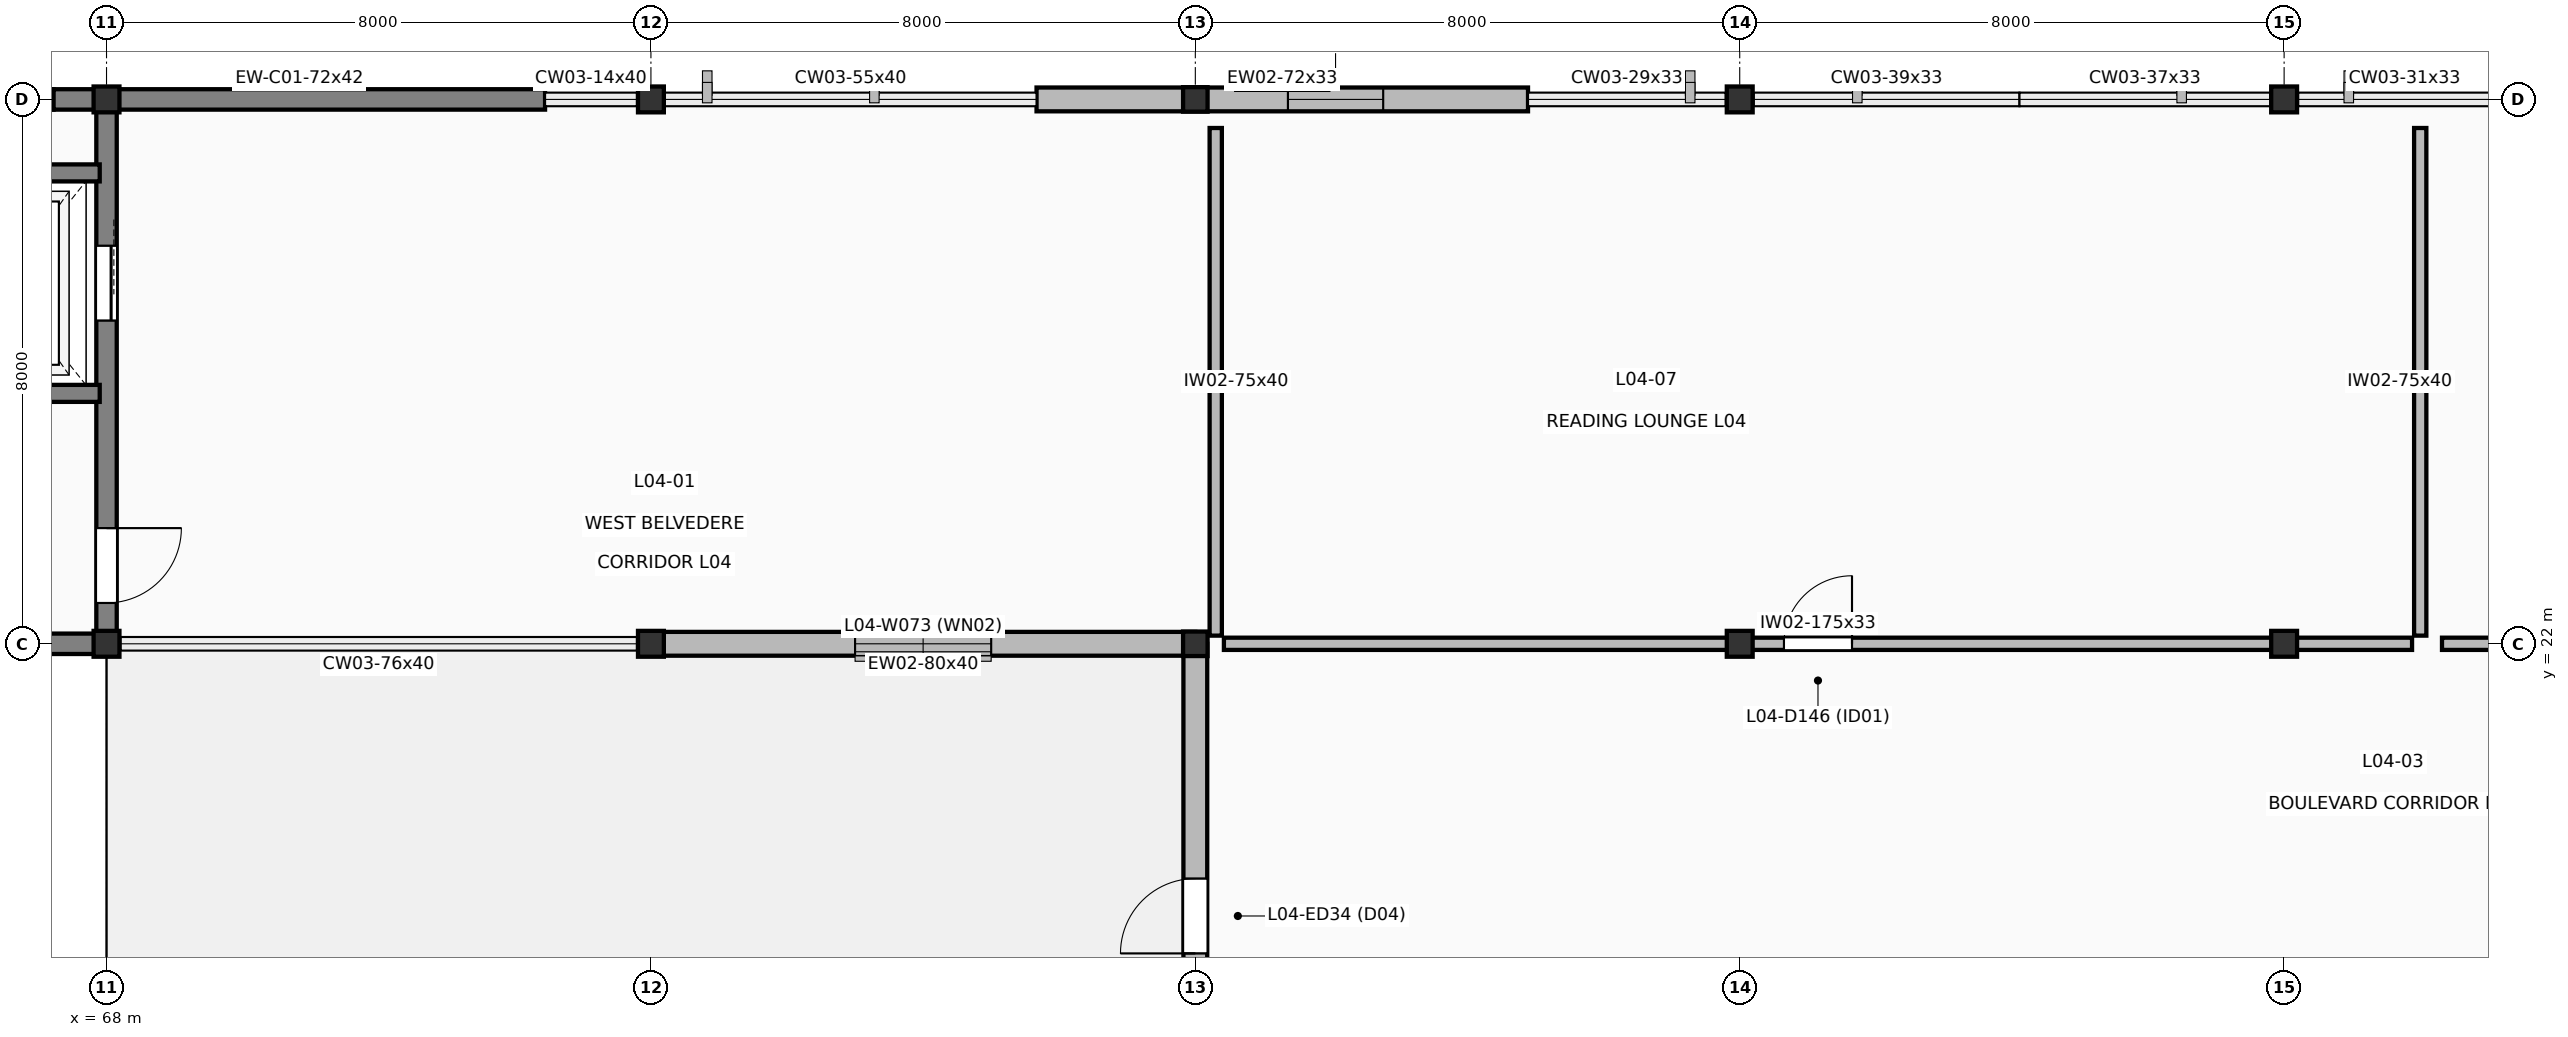
"""IFC4 building model, lengths in metres.
Left out: names, types, materials, properties, quantities, classifications, styles, units other than length and angle.
Written with IfcOpenShell. Run it as: python <this file> out.ifc"""

import sys

from ifc_helpers import new_model, si_unit, direction, frame, frame_2d, origin, origin_2d, place, context, subcontext, project, spatial, rectangle, extrude, element, fill, save


model = new_model("IFC4")
c1 = context("Model", 3, precision=1e-05, world=origin(), true_north=direction((0.0, 1.0)))
c2 = subcontext(c1, "Body", "Model", "MODEL_VIEW")
j1 = project(units=[si_unit("LENGTHUNIT", "METRE"), si_unit("PLANEANGLEUNIT", "RADIAN")], contexts=[c1])
p1 = place(None, origin())
s1 = spatial("IfcSite", under=j1, at=p1, CompositionType="ELEMENT")
p2 = place(p1, origin())
s2 = spatial("IfcBuilding", under=s1, at=p2, CompositionType="ELEMENT")
p3 = place(p2, frame((0.0, 0.0, 18.0)))
s3 = spatial("IfcBuildingStorey", under=s2, at=p3, CompositionType="ELEMENT", Elevation=18.0)
for number, where, z_axis, x_axis in (
    (1, (68.0, 22.0, 0.0), (0.0, 0.0, 1.0), (1.0, 0.0, 0.0)),
    (2, (68.0, 30.0, 0.0), (0.0, 0.0, 1.0), (1.0, 0.0, 0.0)),
    (3, (76.0, 22.0, 0.0), (0.0, 0.0, 1.0), (1.0, 0.0, 0.0)),
    (4, (76.0, 30.0, 0.0), (0.0, 0.0, 1.0), (1.0, 0.0, 0.0)),
):
    element("IfcColumn", number, at=place(p3, frame(where, z_axis=z_axis, x_axis=x_axis)), inside=s3, PredefinedType="COLUMN", context=c2, shape_type="SweptSolid", body=[
        extrude(rectangle(XDim=0.38, YDim=0.38, at=origin_2d()), origin(), (0.0, 0.0, 1.0), 4.2),
    ])
for number, where, z_axis, x_axis in (
    (5, (84.0, 22.0, 0.0), (0.0, 0.0, 1.0), (1.0, 0.0, 0.0)),
    (6, (84.0, 30.0, 0.0), (0.0, 0.0, 1.0), (1.0, 0.0, 0.0)),
):
    element("IfcColumn", number, at=place(p3, frame(where, z_axis=z_axis, x_axis=x_axis)), inside=s3, PredefinedType="COLUMN", context=c2, shape_type="SweptSolid", body=[
        extrude(rectangle(XDim=0.36, YDim=0.36, at=origin_2d()), origin(), (0.0, 0.0, 1.0), 4.2),
    ])
for number, where, z_axis, x_axis in (
    (7, (92.0, 22.0, 0.0), (0.0, 0.0, 1.0), (1.0, 0.0, 0.0)),
    (8, (92.0, 30.0, 0.0), (0.0, 0.0, 1.0), (1.0, 0.0, 0.0)),
    (9, (100.0, 22.0, 0.0), (0.0, 0.0, 1.0), (1.0, 0.0, 0.0)),
    (10, (100.0, 30.0, 0.0), (0.0, 0.0, 1.0), (1.0, 0.0, 0.0)),
):
    element("IfcColumn", number, at=place(p3, frame(where, z_axis=z_axis, x_axis=x_axis)), inside=s3, PredefinedType="COLUMN", context=c2, shape_type="SweptSolid", body=[
        extrude(rectangle(XDim=0.38, YDim=0.38, at=origin_2d()), origin(), (0.0, 0.0, 1.0), 4.2),
    ])
p4 = place(p3, frame((84.0, 14.0, 0.0), z_axis=(0.0, 0.0, 1.0), x_axis=(0.0, 1.0, 0.0)))
e11 = element("IfcWall", 11, at=p4, inside=s3, PredefinedType="SOLIDWALL", context=c2, shape_type="SweptSolid", body=[
    extrude(rectangle(XDim=8.0, YDim=0.35, at=frame_2d((4.0, 0.0))), origin(), (0.0, 0.0, 1.0), 3.345),
])
p5 = place(p4, frame((3.45, 0.0, 0.0)))
e12 = element("IfcOpeningElement", 12, at=p5, cuts=e11, PredefinedType="OPENING", context=c2, shape_type="SweptSolid", body=[
    extrude(rectangle(XDim=1.1, YDim=2.2, at=frame_2d((0.55, 1.1))), frame((0.0, 0.185, 0.0), z_axis=(0.0, -1.0, 0.0), x_axis=(1.0, 0.0, 0.0)), (0.0, 0.0, 1.0), 0.37),
])
p6 = place(p3, frame((84.0, 22.0, 0.0), z_axis=(0.0, 0.0, 1.0), x_axis=(-1.0, 0.0, 0.0)))
e13 = element("IfcWall", 13, at=p6, inside=s3, PredefinedType="SOLIDWALL", context=c2, shape_type="SweptSolid", body=[
    extrude(rectangle(XDim=8.0, YDim=0.35, at=frame_2d((4.0, 0.0))), origin(), (0.0, 0.0, 1.0), 4.0),
])
p7 = place(p6, frame((3.0, 0.0, 0.9)))
e14 = element("IfcOpeningElement", 14, at=p7, cuts=e13, PredefinedType="OPENING", context=c2, shape_type="SweptSolid", body=[
    extrude(rectangle(XDim=2.0, YDim=2.2, at=frame_2d((1.0, 1.1))), frame((0.0, 0.185, 0.0), z_axis=(0.0, -1.0, 0.0), x_axis=(1.0, 0.0, 0.0)), (0.0, 0.0, 1.0), 0.37),
])
for number, where, z_axis, x_axis in (
    (15, (60.0, 30.0, 0.0), (0.0, 0.0, 1.0), (1.0, 0.0, 0.0)),
    (16, (67.222, 30.0, 0.0), (0.0, 0.0, 1.0), (1.0, 0.0, 0.0)),
):
    element("IfcWall", number, at=place(p3, frame(where, z_axis=z_axis, x_axis=x_axis)), inside=s3, PredefinedType="SOLIDWALL", context=c2, shape_type="SweptSolid", body=[
        extrude(rectangle(XDim=7.222, YDim=0.3, at=frame_2d((3.611, 0.0))), origin(), (0.0, 0.0, 1.0), 4.2),
    ])
p8 = place(p3, frame((81.667, 30.0, 0.0), z_axis=(0.0, 0.0, 1.0), x_axis=(1.0, 0.0, 0.0)))
e17 = element("IfcWall", 17, at=p8, inside=s3, PredefinedType="SOLIDWALL", context=c2, shape_type="SweptSolid", body=[
    extrude(rectangle(XDim=7.222, YDim=0.35, at=frame_2d((3.611, 0.0))), origin(), (0.0, 0.0, 1.0), 3.285),
])
p9 = place(p8, frame((3.694, 0.0, 0.95)))
e18 = element("IfcOpeningElement", 18, at=p9, cuts=e17, PredefinedType="OPENING", context=c2, shape_type="SweptSolid", body=[
    extrude(rectangle(XDim=1.4, YDim=1.8, at=frame_2d((0.7, 0.9))), frame((0.0, 0.185, 0.0), z_axis=(0.0, -1.0, 0.0), x_axis=(1.0, 0.0, 0.0)), (0.0, 0.0, 1.0), 0.37),
])
p10 = place(p3, frame((68.0, 22.0, 0.0), z_axis=(0.0, 0.0, 1.0), x_axis=(-1.0, 0.0, 0.0)))
e19 = element("IfcWall", 19, at=p10, inside=s3, PredefinedType="SHEAR", context=c2, shape_type="SweptSolid", body=[
    extrude(rectangle(XDim=8.0, YDim=0.3, at=frame_2d((4.0, 0.0))), origin(), (0.0, 0.0, 1.0), 4.2),
])
p11 = place(p3, frame((68.0, 30.0, 0.0), z_axis=(0.0, 0.0, 1.0), x_axis=(0.0, -1.0, 0.0)))
e20 = element("IfcWall", 20, at=p11, inside=s3, PredefinedType="SHEAR", context=c2, shape_type="SweptSolid", body=[
    extrude(rectangle(XDim=8.0, YDim=0.3, at=frame_2d((4.0, 0.0))), origin(), (0.0, 0.0, 1.0), 4.2),
])
p12 = place(p11, frame((6.3, 0.0, 0.0)))
e21 = element("IfcOpeningElement", 21, at=p12, cuts=e20, PredefinedType="OPENING", context=c2, shape_type="SweptSolid", body=[
    extrude(rectangle(XDim=1.1, YDim=2.2, at=frame_2d((0.55, 1.1))), frame((0.0, 0.16, 0.0), z_axis=(0.0, -1.0, 0.0), x_axis=(1.0, 0.0, 0.0)), (0.0, 0.0, 1.0), 0.32),
])
p13 = place(p11, frame((2.15, 0.0, 0.0)))
e22 = element("IfcOpeningElement", 22, at=p13, cuts=e20, PredefinedType="OPENING", context=c2, shape_type="SweptSolid", body=[
    extrude(rectangle(XDim=1.1, YDim=2.2, at=frame_2d((0.55, 1.1))), frame((0.0, 0.16, 0.0), z_axis=(0.0, -1.0, 0.0), x_axis=(1.0, 0.0, 0.0)), (0.0, 0.0, 1.0), 0.32),
])
for number, where, z_axis, x_axis in (
    (23, (65.2, 25.68, 0.0), (0.0, 0.0, 1.0), (1.0, 0.0, 0.0)),
    (24, (65.2, 28.92, 0.0), (0.0, 0.0, 1.0), (1.0, 0.0, 0.0)),
):
    element("IfcWall", number, at=place(p3, frame(where, z_axis=z_axis, x_axis=x_axis)), inside=s3, PredefinedType="SHEAR", context=c2, shape_type="SweptSolid", body=[
        extrude(rectangle(XDim=2.7, YDim=0.25, at=frame_2d((1.35, 0.0))), origin(), (0.0, 0.0, 1.0), 4.2),
    ])
p14 = place(p3, frame((84.42, 22.0, 0.0), z_axis=(0.0, 0.0, 1.0), x_axis=(1.0, 0.0, 0.0)))
e25 = element("IfcWall", 25, at=p14, inside=s3, PredefinedType="PARTITIONING", context=c2, shape_type="SweptSolid", body=[
    extrude(rectangle(XDim=17.46, YDim=0.18, at=frame_2d((8.73, 0.0))), origin(), (0.0, 0.0, 1.0), 3.285),
])
p15 = place(p14, frame((8.23, 0.0, 0.0)))
e26 = element("IfcOpeningElement", 26, at=p15, cuts=e25, PredefinedType="OPENING", context=c2, shape_type="SweptSolid", body=[
    extrude(rectangle(XDim=1.0, YDim=2.15, at=frame_2d((0.5, 1.075))), frame((0.0, 0.1, 0.0), z_axis=(0.0, -1.0, 0.0), x_axis=(1.0, 0.0, 0.0)), (0.0, 0.0, 1.0), 0.2),
])
for number, where, z_axis, x_axis in (
    (27, (84.3, 29.58, 0.0), (0.0, 0.0, 1.0), (0.0, -1.0, 0.0)),
    (28, (102.0, 22.12, 0.0), (0.0, 0.0, 1.0), (0.0, 1.0, 0.0)),
):
    element("IfcWall", number, at=place(p3, frame(where, z_axis=z_axis, x_axis=x_axis)), inside=s3, PredefinedType="PARTITIONING", context=c2, shape_type="SweptSolid", body=[
        extrude(rectangle(XDim=7.46, YDim=0.18, at=frame_2d((3.73, 0.0))), origin(), (0.0, 0.0, 1.0), 4.0),
    ])
p16 = place(p3, frame((102.32, 22.0, 0.0), z_axis=(0.0, 0.0, 1.0), x_axis=(1.0, 0.0, 0.0)))
e29 = element("IfcWall", 29, at=p16, inside=s3, PredefinedType="PARTITIONING", context=c2, shape_type="SweptSolid", body=[
    extrude(rectangle(XDim=13.56, YDim=0.18, at=frame_2d((6.78, 0.0))), origin(), (0.0, 0.0, 1.0), 3.285),
])
p17 = place(p16, frame((6.28, 0.0, 0.0)))
e30 = element("IfcOpeningElement", 30, at=p17, cuts=e29, PredefinedType="OPENING", context=c2, shape_type="SweptSolid", body=[
    extrude(rectangle(XDim=1.0, YDim=2.15, at=frame_2d((0.5, 1.075))), frame((0.0, 0.1, 0.0), z_axis=(0.0, -1.0, 0.0), x_axis=(1.0, 0.0, 0.0)), (0.0, 0.0, 1.0), 0.2),
])
p18 = place(p5, origin())
e31 = element("IfcDoor", 31, at=p18, inside=s3, OperationType="SINGLE_SWING_LEFT", PredefinedType="DOOR", context=c2, shape_type="SweptSolid", body=[
    extrude(rectangle(XDim=1.1, YDim=2.2, at=frame_2d((0.55, 1.1))), frame((0.0, 0.025, 0.0), z_axis=(0.0, -1.0, 0.0), x_axis=(1.0, 0.0, 0.0)), (0.0, 0.0, 1.0), 0.05),
])
fill(e12, e31)
p19 = place(p7, origin())
e32 = element("IfcWindow", 32, at=p19, inside=s3, PartitioningType="DOUBLE_PANEL_VERTICAL", PredefinedType="WINDOW", context=c2, shape_type="SweptSolid", body=[
    extrude(rectangle(XDim=2.0, YDim=2.2, at=frame_2d((1.0, 1.1))), frame((0.0, 0.03, 0.0), z_axis=(0.0, -1.0, 0.0), x_axis=(1.0, 0.0, 0.0)), (0.0, 0.0, 1.0), 0.06),
])
fill(e14, e32)
p20 = place(p9, origin())
e33 = element("IfcWindow", 33, at=p20, inside=s3, PartitioningType="SINGLE_PANEL", PredefinedType="WINDOW", context=c2, shape_type="SweptSolid", body=[
    extrude(rectangle(XDim=1.4, YDim=1.8, at=frame_2d((0.7, 0.9))), frame((0.0, 0.03, 0.0), z_axis=(0.0, -1.0, 0.0), x_axis=(1.0, 0.0, 0.0)), (0.0, 0.0, 1.0), 0.06),
])
fill(e18, e33)
p21 = place(p12, origin())
e34 = element("IfcDoor", 34, at=p21, inside=s3, OperationType="SINGLE_SWING_LEFT", PredefinedType="DOOR", context=c2, shape_type="SweptSolid", body=[
    extrude(rectangle(XDim=1.1, YDim=2.2, at=frame_2d((0.55, 1.1))), frame((0.0, 0.025, 0.0), z_axis=(0.0, -1.0, 0.0), x_axis=(1.0, 0.0, 0.0)), (0.0, 0.0, 1.0), 0.05),
])
fill(e21, e34)
p22 = place(p13, origin())
e35 = element("IfcDoor", 35, at=p22, inside=s3, OperationType="SLIDING_TO_LEFT", PredefinedType="DOOR", context=c2, shape_type="SweptSolid", body=[
    extrude(rectangle(XDim=1.1, YDim=2.2, at=frame_2d((0.55, 1.1))), frame((0.0, 0.025, 0.0), z_axis=(0.0, -1.0, 0.0), x_axis=(1.0, 0.0, 0.0)), (0.0, 0.0, 1.0), 0.05),
])
fill(e22, e35)
p23 = place(p15, origin())
e36 = element("IfcDoor", 36, at=p23, inside=s3, OperationType="SINGLE_SWING_RIGHT", PredefinedType="DOOR", context=c2, shape_type="SweptSolid", body=[
    extrude(rectangle(XDim=1.0, YDim=2.15, at=frame_2d((0.5, 1.075))), frame((0.0, 0.025, 0.0), z_axis=(0.0, -1.0, 0.0), x_axis=(1.0, 0.0, 0.0)), (0.0, 0.0, 1.0), 0.05),
])
fill(e26, e36)
save(model, sys.argv[1])
